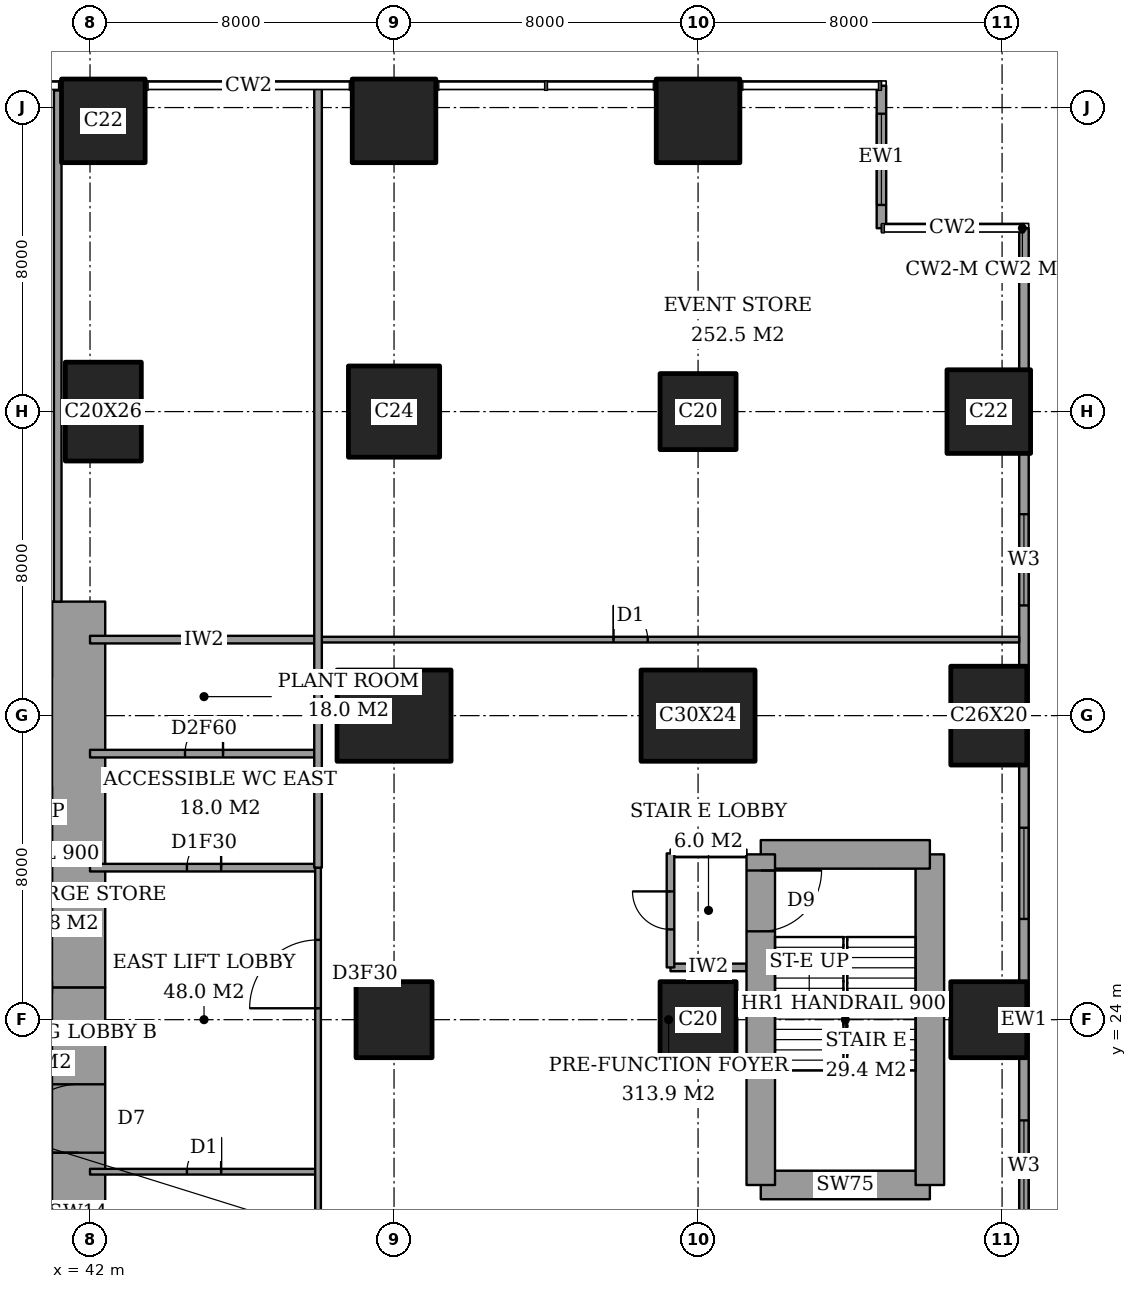
"""IFC4 building model, lengths in metres.
Left out: names, types, materials, properties, quantities, classifications, styles, units other than length and angle.
Written with IfcOpenShell. Run it as: python <this file> out.ifc"""

import sys

from ifc_helpers import new_model, si_unit, direction, frame, frame_2d, origin, origin_2d, place, context, subcontext, project, spatial, rectangle, extrude, element, fill, save


model = new_model("IFC4")
c1 = context("Model", 3, precision=1e-05, world=origin(), true_north=direction((0.0, 1.0)))
c2 = subcontext(c1, "Body", "Model", "MODEL_VIEW")
j1 = project(units=[si_unit("LENGTHUNIT", "METRE"), si_unit("PLANEANGLEUNIT", "RADIAN")], contexts=[c1])
p1 = place(None, origin())
s1 = spatial("IfcSite", under=j1, at=p1, CompositionType="ELEMENT")
p2 = place(p1, origin())
s2 = spatial("IfcBuilding", under=s1, at=p2, CompositionType="ELEMENT")
p3 = place(p2, frame((0.0, 0.0, 21.0)))
s3 = spatial("IfcBuildingStorey", under=s2, at=p3, CompositionType="ELEMENT", Elevation=21.0)
p4 = place(p3, frame((42.35, 40.0, 0.0), z_axis=(0.0, 0.0, 1.0), x_axis=(1.0, 0.0, 0.0)))
e1 = element("IfcColumn", 1, at=p4, inside=s3, PredefinedType="COLUMN", context=c2, shape_type="SweptSolid", body=[
    extrude(rectangle(XDim=2.0, YDim=2.6, at=origin_2d()), origin(), (0.0, 0.0, 1.0), 5.0),
])
p5 = place(p3, frame((42.35, 47.65, 0.0), z_axis=(0.0, 0.0, 1.0), x_axis=(1.0, 0.0, 0.0)))
e2 = element("IfcColumn", 2, at=p5, inside=s3, PredefinedType="COLUMN", context=c2, shape_type="SweptSolid", body=[
    extrude(rectangle(XDim=2.2, YDim=2.2, at=origin_2d()), origin(), (0.0, 0.0, 1.0), 5.0),
])
p6 = place(p3, frame((50.0, 24.0, 0.0), z_axis=(0.0, 0.0, 1.0), x_axis=(1.0, 0.0, 0.0)))
e3 = element("IfcColumn", 3, at=p6, inside=s3, PredefinedType="COLUMN", context=c2, shape_type="SweptSolid", body=[
    extrude(rectangle(XDim=2.0, YDim=2.0, at=origin_2d()), origin(), (0.0, 0.0, 1.0), 5.0),
])
p7 = place(p3, frame((50.0, 32.0, 0.0), z_axis=(0.0, 0.0, 1.0), x_axis=(1.0, 0.0, 0.0)))
e4 = element("IfcColumn", 4, at=p7, inside=s3, PredefinedType="COLUMN", context=c2, shape_type="SweptSolid", body=[
    extrude(rectangle(XDim=3.0, YDim=2.4, at=origin_2d()), origin(), (0.0, 0.0, 1.0), 5.0),
])
p8 = place(p3, frame((50.0, 40.0, 0.0), z_axis=(0.0, 0.0, 1.0), x_axis=(1.0, 0.0, 0.0)))
e5 = element("IfcColumn", 5, at=p8, inside=s3, PredefinedType="COLUMN", context=c2, shape_type="SweptSolid", body=[
    extrude(rectangle(XDim=2.4, YDim=2.4, at=origin_2d()), origin(), (0.0, 0.0, 1.0), 5.0),
])
p9 = place(p3, frame((50.0, 47.65, 0.0), z_axis=(0.0, 0.0, 1.0), x_axis=(1.0, 0.0, 0.0)))
e6 = element("IfcColumn", 6, at=p9, inside=s3, PredefinedType="COLUMN", context=c2, shape_type="SweptSolid", body=[
    extrude(rectangle(XDim=2.2, YDim=2.2, at=origin_2d()), origin(), (0.0, 0.0, 1.0), 5.0),
])
p10 = place(p3, frame((58.0, 24.0, 0.0), z_axis=(0.0, 0.0, 1.0), x_axis=(1.0, 0.0, 0.0)))
e7 = element("IfcColumn", 7, at=p10, inside=s3, PredefinedType="COLUMN", context=c2, shape_type="SweptSolid", body=[
    extrude(rectangle(XDim=2.0, YDim=2.0, at=origin_2d()), origin(), (0.0, 0.0, 1.0), 5.0),
])
p11 = place(p3, frame((58.0, 32.0, 0.0), z_axis=(0.0, 0.0, 1.0), x_axis=(1.0, 0.0, 0.0)))
e8 = element("IfcColumn", 8, at=p11, inside=s3, PredefinedType="COLUMN", context=c2, shape_type="SweptSolid", body=[
    extrude(rectangle(XDim=3.0, YDim=2.4, at=origin_2d()), origin(), (0.0, 0.0, 1.0), 5.0),
])
p12 = place(p3, frame((58.0, 40.0, 0.0), z_axis=(0.0, 0.0, 1.0), x_axis=(1.0, 0.0, 0.0)))
e9 = element("IfcColumn", 9, at=p12, inside=s3, PredefinedType="COLUMN", context=c2, shape_type="SweptSolid", body=[
    extrude(rectangle(XDim=2.0, YDim=2.0, at=origin_2d()), origin(), (0.0, 0.0, 1.0), 5.0),
])
p13 = place(p3, frame((58.0, 47.65, 0.0), z_axis=(0.0, 0.0, 1.0), x_axis=(1.0, 0.0, 0.0)))
e10 = element("IfcColumn", 10, at=p13, inside=s3, PredefinedType="COLUMN", context=c2, shape_type="SweptSolid", body=[
    extrude(rectangle(XDim=2.2, YDim=2.2, at=origin_2d()), origin(), (0.0, 0.0, 1.0), 5.0),
])
p14 = place(p3, frame((65.65, 24.0, 0.0), z_axis=(0.0, 0.0, 1.0), x_axis=(1.0, 0.0, 0.0)))
e11 = element("IfcColumn", 11, at=p14, inside=s3, PredefinedType="COLUMN", context=c2, shape_type="SweptSolid", body=[
    extrude(rectangle(XDim=2.0, YDim=2.0, at=origin_2d()), origin(), (0.0, 0.0, 1.0), 5.0),
])
p15 = place(p3, frame((65.65, 32.0, 0.0), z_axis=(0.0, 0.0, 1.0), x_axis=(0.0, 1.0, 0.0)))
e12 = element("IfcColumn", 12, at=p15, inside=s3, PredefinedType="COLUMN", context=c2, shape_type="SweptSolid", body=[
    extrude(rectangle(XDim=2.6, YDim=2.0, at=origin_2d()), origin(), (0.0, 0.0, 1.0), 5.0),
])
p16 = place(p3, frame((65.65, 40.0, 0.0), z_axis=(0.0, 0.0, 1.0), x_axis=(1.0, 0.0, 0.0)))
e13 = element("IfcColumn", 13, at=p16, inside=s3, PredefinedType="COLUMN", context=c2, shape_type="SweptSolid", body=[
    extrude(rectangle(XDim=2.2, YDim=2.2, at=origin_2d()), origin(), (0.0, 0.0, 1.0), 5.0),
])
p17 = place(p3, frame((41.7, 13.0, 0.0), z_axis=(0.0, 0.0, 1.0), x_axis=(0.0, 1.0, 0.0)))
e14 = element("IfcWall", 14, at=p17, inside=s3, PredefinedType="SHEAR", context=c2, shape_type="SweptSolid", body=[
    extrude(rectangle(XDim=11.85, YDim=1.4, at=frame_2d((5.925, 0.0))), origin(), (0.0, 0.0, 1.0), 5.0),
])
p18 = place(p17, frame((7.5, 0.0, 0.0)))
e15 = element("IfcOpeningElement", 15, at=p18, cuts=e14, PredefinedType="OPENING", context=c2, shape_type="SweptSolid", body=[
    extrude(rectangle(XDim=1.8, YDim=2.4, at=frame_2d((0.9, 1.2))), frame((0.0, 0.71, 0.0), z_axis=(0.0, -1.0, 0.0), x_axis=(1.0, 0.0, 0.0)), (0.0, 0.0, 1.0), 1.42),
])
p19 = place(p3, frame((41.7, 24.85, 0.0), z_axis=(0.0, 0.0, 1.0), x_axis=(0.0, 1.0, 0.0)))
e16 = element("IfcWall", 16, at=p19, inside=s3, PredefinedType="SHEAR", context=c2, shape_type="SweptSolid", body=[
    extrude(rectangle(XDim=10.15, YDim=1.4, at=frame_2d((5.075, 0.0))), origin(), (0.0, 0.0, 1.0), 5.0),
])
p20 = place(p3, frame((59.65, 19.65, 0.0), z_axis=(0.0, 0.0, 1.0), x_axis=(1.0, 0.0, 0.0)))
e17 = element("IfcWall", 17, at=p20, inside=s3, PredefinedType="SHEAR", context=c2, shape_type="SweptSolid", body=[
    extrude(rectangle(XDim=4.45, YDim=0.75, at=frame_2d((2.225, 0.0))), origin(), (0.0, 0.0, 1.0), 5.0),
])
p21 = place(p3, frame((64.1, 19.65, 0.0), z_axis=(0.0, 0.0, 1.0), x_axis=(0.0, 1.0, 0.0)))
e18 = element("IfcWall", 18, at=p21, inside=s3, PredefinedType="SHEAR", context=c2, shape_type="SweptSolid", body=[
    extrude(rectangle(XDim=8.7, YDim=0.75, at=frame_2d((4.35, 0.0))), origin(), (0.0, 0.0, 1.0), 5.0),
])
p22 = place(p3, frame((64.1, 28.35, 0.0), z_axis=(0.0, 0.0, 1.0), x_axis=(-1.0, 0.0, 0.0)))
e19 = element("IfcWall", 19, at=p22, inside=s3, PredefinedType="SHEAR", context=c2, shape_type="SweptSolid", body=[
    extrude(rectangle(XDim=4.45, YDim=0.75, at=frame_2d((2.225, 0.0))), origin(), (0.0, 0.0, 1.0), 5.0),
])
p23 = place(p3, frame((59.65, 28.35, 0.0), z_axis=(0.0, 0.0, 1.0), x_axis=(0.0, -1.0, 0.0)))
e20 = element("IfcWall", 20, at=p23, inside=s3, PredefinedType="SHEAR", context=c2, shape_type="SweptSolid", body=[
    extrude(rectangle(XDim=8.7, YDim=0.75, at=frame_2d((4.35, 0.0))), origin(), (0.0, 0.0, 1.0), 5.0),
])
p24 = place(p23, frame((0.425, 0.0, 0.0)))
e21 = element("IfcOpeningElement", 21, at=p24, cuts=e20, PredefinedType="OPENING", context=c2, shape_type="SweptSolid", body=[
    extrude(rectangle(XDim=1.6, YDim=2.1, at=frame_2d((0.8, 1.05))), frame((0.0, 0.385, 0.0), z_axis=(0.0, -1.0, 0.0), x_axis=(1.0, 0.0, 0.0)), (0.0, 0.0, 1.0), 0.77),
])
p25 = place(p3, frame((66.575, 3.175, 0.0), z_axis=(0.0, 0.0, 1.0), x_axis=(0.0, 1.0, 0.0)))
e22 = element("IfcWall", 22, at=p25, inside=s3, PredefinedType="SOLIDWALL", context=c2, shape_type="SweptSolid", body=[
    extrude(rectangle(XDim=41.65, YDim=0.25, at=frame_2d((20.825, 0.0))), origin(), (0.0, 0.0, 1.0), 5.0),
])
p26 = place(p25, frame((7.475, 0.0, 0.6)))
e23 = element("IfcOpeningElement", 23, at=p26, cuts=e22, PredefinedType="OPENING", context=c2, shape_type="SweptSolid", body=[
    extrude(rectangle(XDim=2.4, YDim=3.0, at=frame_2d((1.2, 1.5))), frame((0.0, 0.135, 0.0), z_axis=(0.0, -1.0, 0.0), x_axis=(1.0, 0.0, 0.0)), (0.0, 0.0, 1.0), 0.27),
])
p27 = place(p25, frame((15.775, 0.0, 0.6)))
e24 = element("IfcOpeningElement", 24, at=p27, cuts=e22, PredefinedType="OPENING", context=c2, shape_type="SweptSolid", body=[
    extrude(rectangle(XDim=2.4, YDim=3.0, at=frame_2d((1.2, 1.5))), frame((0.0, 0.135, 0.0), z_axis=(0.0, -1.0, 0.0), x_axis=(1.0, 0.0, 0.0)), (0.0, 0.0, 1.0), 0.27),
])
p28 = place(p25, frame((23.475, 0.0, 0.6)))
e25 = element("IfcOpeningElement", 25, at=p28, cuts=e22, PredefinedType="OPENING", context=c2, shape_type="SweptSolid", body=[
    extrude(rectangle(XDim=2.4, YDim=3.0, at=frame_2d((1.2, 1.5))), frame((0.0, 0.135, 0.0), z_axis=(0.0, -1.0, 0.0), x_axis=(1.0, 0.0, 0.0)), (0.0, 0.0, 1.0), 0.27),
])
p29 = place(p25, frame((31.725, 0.0, 0.6)))
e26 = element("IfcOpeningElement", 26, at=p29, cuts=e22, PredefinedType="OPENING", context=c2, shape_type="SweptSolid", body=[
    extrude(rectangle(XDim=2.4, YDim=3.0, at=frame_2d((1.2, 1.5))), frame((0.0, 0.135, 0.0), z_axis=(0.0, -1.0, 0.0), x_axis=(1.0, 0.0, 0.0)), (0.0, 0.0, 1.0), 0.27),
])
p30 = place(p3, frame((62.825, 44.825, 0.0), z_axis=(0.0, 0.0, 1.0), x_axis=(0.0, 1.0, 0.0)))
e27 = element("IfcWall", 27, at=p30, inside=s3, PredefinedType="SOLIDWALL", context=c2, shape_type="SweptSolid", body=[
    extrude(rectangle(XDim=3.75, YDim=0.25, at=frame_2d((1.875, 0.0))), origin(), (0.0, 0.0, 1.0), 5.0),
])
p31 = place(p30, frame((0.613, 0.0, 0.6)))
e28 = element("IfcOpeningElement", 28, at=p31, cuts=e27, PredefinedType="OPENING", context=c2, shape_type="SweptSolid", body=[
    extrude(rectangle(XDim=2.4, YDim=3.0, at=frame_2d((1.2, 1.5))), frame((0.0, 0.135, 0.0), z_axis=(0.0, -1.0, 0.0), x_axis=(1.0, 0.0, 0.0)), (0.0, 0.0, 1.0), 0.27),
])
p32 = place(p3, frame((42.0, 20.0, 0.0), z_axis=(0.0, 0.0, 1.0), x_axis=(1.0, 0.0, 0.0)))
e29 = element("IfcWall", 29, at=p32, inside=s3, PredefinedType="PARTITIONING", context=c2, shape_type="SweptSolid", body=[
    extrude(rectangle(XDim=6.0, YDim=0.15, at=frame_2d((3.0, 0.0))), origin(), (0.0, 0.0, 1.0), 4.65),
])
p33 = place(p32, frame((2.55, 0.0, 0.0)))
e30 = element("IfcOpeningElement", 30, at=p33, cuts=e29, PredefinedType="OPENING", context=c2, shape_type="SweptSolid", body=[
    extrude(rectangle(XDim=0.9, YDim=2.1, at=frame_2d((0.45, 1.05))), frame((0.0, 0.085, 0.0), z_axis=(0.0, -1.0, 0.0), x_axis=(1.0, 0.0, 0.0)), (0.0, 0.0, 1.0), 0.17),
])
p34 = place(p3, frame((57.275, 25.375, 0.0), z_axis=(0.0, 0.0, 1.0), x_axis=(1.0, 0.0, 0.0)))
e31 = element("IfcWall", 31, at=p34, inside=s3, PredefinedType="PARTITIONING", context=c2, shape_type="SweptSolid", body=[
    extrude(rectangle(XDim=2.0, YDim=0.2, at=frame_2d((1.0, 0.0))), origin(), (0.0, 0.0, 1.0), 4.65),
])
p35 = place(p3, frame((42.0, 28.0, 0.0), z_axis=(0.0, 0.0, 1.0), x_axis=(1.0, 0.0, 0.0)))
e32 = element("IfcWall", 32, at=p35, inside=s3, PredefinedType="PARTITIONING", context=c2, shape_type="SweptSolid", body=[
    extrude(rectangle(XDim=6.0, YDim=0.2, at=frame_2d((3.0, 0.0))), origin(), (0.0, 0.0, 1.0), 4.65),
])
p36 = place(p35, frame((2.55, 0.0, 0.0)))
e33 = element("IfcOpeningElement", 33, at=p36, cuts=e32, PredefinedType="OPENING", context=c2, shape_type="SweptSolid", body=[
    extrude(rectangle(XDim=0.9, YDim=2.1, at=frame_2d((0.45, 1.05))), frame((0.0, 0.11, 0.0), z_axis=(0.0, -1.0, 0.0), x_axis=(1.0, 0.0, 0.0)), (0.0, 0.0, 1.0), 0.22),
])
p37 = place(p3, frame((57.275, 28.375, 0.0), z_axis=(0.0, 0.0, 1.0), x_axis=(1.0, 0.0, 0.0)))
e34 = element("IfcWall", 34, at=p37, inside=s3, PredefinedType="PARTITIONING", context=c2, shape_type="SweptSolid", body=[
    extrude(rectangle(XDim=2.0, YDim=0.2, at=frame_2d((1.0, 0.0))), origin(), (0.0, 0.0, 1.0), 4.65),
])
p38 = place(p3, frame((42.0, 31.0, 0.0), z_axis=(0.0, 0.0, 1.0), x_axis=(1.0, 0.0, 0.0)))
e35 = element("IfcWall", 35, at=p38, inside=s3, PredefinedType="PARTITIONING", context=c2, shape_type="SweptSolid", body=[
    extrude(rectangle(XDim=6.0, YDim=0.2, at=frame_2d((3.0, 0.0))), origin(), (0.0, 0.0, 1.0), 4.65),
])
p39 = place(p38, frame((2.5, 0.0, 0.0)))
e36 = element("IfcOpeningElement", 36, at=p39, cuts=e35, PredefinedType="OPENING", context=c2, shape_type="SweptSolid", body=[
    extrude(rectangle(XDim=1.0, YDim=2.1, at=frame_2d((0.5, 1.05))), frame((0.0, 0.11, 0.0), z_axis=(0.0, -1.0, 0.0), x_axis=(1.0, 0.0, 0.0)), (0.0, 0.0, 1.0), 0.22),
])
p40 = place(p3, frame((42.0, 34.0, 0.0), z_axis=(0.0, 0.0, 1.0), x_axis=(1.0, 0.0, 0.0)))
e37 = element("IfcWall", 37, at=p40, inside=s3, PredefinedType="PARTITIONING", context=c2, shape_type="SweptSolid", body=[
    extrude(rectangle(XDim=6.0, YDim=0.2, at=frame_2d((3.0, 0.0))), origin(), (0.0, 0.0, 1.0), 4.65),
])
p41 = place(p3, frame((48.0, 34.0, 0.0), z_axis=(0.0, 0.0, 1.0), x_axis=(1.0, 0.0, 0.0)))
e38 = element("IfcWall", 38, at=p41, inside=s3, PredefinedType="PARTITIONING", context=c2, shape_type="SweptSolid", body=[
    extrude(rectangle(XDim=18.45, YDim=0.15, at=frame_2d((9.225, 0.0))), origin(), (0.0, 0.0, 1.0), 4.65),
])
p42 = place(p41, frame((7.775, 0.0, 0.0)))
e39 = element("IfcOpeningElement", 39, at=p42, cuts=e38, PredefinedType="OPENING", context=c2, shape_type="SweptSolid", body=[
    extrude(rectangle(XDim=0.9, YDim=2.1, at=frame_2d((0.45, 1.05))), frame((0.0, 0.085, 0.0), z_axis=(0.0, -1.0, 0.0), x_axis=(1.0, 0.0, 0.0)), (0.0, 0.0, 1.0), 0.17),
])
p43 = place(p3, frame((41.15, 35.0, 0.0), z_axis=(0.0, 0.0, 1.0), x_axis=(0.0, 1.0, 0.0)))
e40 = element("IfcWall", 40, at=p43, inside=s3, PredefinedType="PARTITIONING", context=c2, shape_type="SweptSolid", body=[
    extrude(rectangle(XDim=13.45, YDim=0.2, at=frame_2d((6.725, 0.0))), origin(), (0.0, 0.0, 1.0), 4.65),
])
p44 = place(p3, frame((48.0, 28.0, 0.0), z_axis=(0.0, 0.0, 1.0), x_axis=(0.0, 1.0, 0.0)))
e41 = element("IfcWall", 41, at=p44, inside=s3, PredefinedType="PARTITIONING", context=c2, shape_type="SweptSolid", body=[
    extrude(rectangle(XDim=20.561, YDim=0.2, at=frame_2d((10.281, 0.0))), origin(), (0.0, 0.0, 1.0), 4.65),
])
p45 = place(p3, frame((48.0, 14.0, 0.0), z_axis=(0.0, 0.0, 1.0), x_axis=(0.0, 1.0, 0.0)))
e42 = element("IfcWall", 42, at=p45, inside=s3, PredefinedType="PARTITIONING", context=c2, shape_type="SweptSolid", body=[
    extrude(rectangle(XDim=14.0, YDim=0.15, at=frame_2d((7.0, 0.0))), origin(), (0.0, 0.0, 1.0), 4.65),
])
p46 = place(p45, frame((10.3, 0.0, 0.0)))
e43 = element("IfcOpeningElement", 43, at=p46, cuts=e42, PredefinedType="OPENING", context=c2, shape_type="SweptSolid", body=[
    extrude(rectangle(XDim=1.8, YDim=2.1, at=frame_2d((0.9, 1.05))), frame((0.0, 0.085, 0.0), z_axis=(0.0, -1.0, 0.0), x_axis=(1.0, 0.0, 0.0)), (0.0, 0.0, 1.0), 0.17),
])
p47 = place(p3, frame((57.275, 25.375, 0.0), z_axis=(0.0, 0.0, 1.0), x_axis=(0.0, 1.0, 0.0)))
e44 = element("IfcWall", 44, at=p47, inside=s3, PredefinedType="PARTITIONING", context=c2, shape_type="SweptSolid", body=[
    extrude(rectangle(XDim=3.0, YDim=0.2, at=frame_2d((1.5, 0.0))), origin(), (0.0, 0.0, 1.0), 4.65),
])
p48 = place(p47, frame((1.0, 0.0, 0.0)))
e45 = element("IfcOpeningElement", 45, at=p48, cuts=e44, PredefinedType="OPENING", context=c2, shape_type="SweptSolid", body=[
    extrude(rectangle(XDim=1.0, YDim=2.1, at=frame_2d((0.5, 1.05))), frame((0.0, 0.11, 0.0), z_axis=(0.0, -1.0, 0.0), x_axis=(1.0, 0.0, 0.0)), (0.0, 0.0, 1.0), 0.22),
])
p49 = place(p27, origin())
e46 = element("IfcWindow", 46, at=p49, inside=s3, PartitioningType="SINGLE_PANEL", PredefinedType="WINDOW", context=c2, shape_type="SweptSolid", body=[
    extrude(rectangle(XDim=2.4, YDim=3.0, at=frame_2d((1.2, 1.5))), frame((0.0, 0.03, 0.0), z_axis=(0.0, -1.0, 0.0), x_axis=(1.0, 0.0, 0.0)), (0.0, 0.0, 1.0), 0.06),
])
fill(e24, e46)
p50 = place(p28, origin())
e47 = element("IfcWindow", 47, at=p50, inside=s3, PartitioningType="SINGLE_PANEL", PredefinedType="WINDOW", context=c2, shape_type="SweptSolid", body=[
    extrude(rectangle(XDim=2.4, YDim=3.0, at=frame_2d((1.2, 1.5))), frame((0.0, 0.03, 0.0), z_axis=(0.0, -1.0, 0.0), x_axis=(1.0, 0.0, 0.0)), (0.0, 0.0, 1.0), 0.06),
])
fill(e25, e47)
p51 = place(p29, origin())
e48 = element("IfcWindow", 48, at=p51, inside=s3, PartitioningType="SINGLE_PANEL", PredefinedType="WINDOW", context=c2, shape_type="SweptSolid", body=[
    extrude(rectangle(XDim=2.4, YDim=3.0, at=frame_2d((1.2, 1.5))), frame((0.0, 0.03, 0.0), z_axis=(0.0, -1.0, 0.0), x_axis=(1.0, 0.0, 0.0)), (0.0, 0.0, 1.0), 0.06),
])
fill(e26, e48)
p52 = place(p31, origin())
e49 = element("IfcWindow", 49, at=p52, inside=s3, PartitioningType="SINGLE_PANEL", PredefinedType="WINDOW", context=c2, shape_type="SweptSolid", body=[
    extrude(rectangle(XDim=2.4, YDim=3.0, at=frame_2d((1.2, 1.5))), frame((0.0, 0.03, 0.0), z_axis=(0.0, -1.0, 0.0), x_axis=(1.0, 0.0, 0.0)), (0.0, 0.0, 1.0), 0.06),
])
fill(e28, e49)
p53 = place(p42, origin())
e50 = element("IfcDoor", 50, at=p53, inside=s3, OperationType="SINGLE_SWING_RIGHT", PredefinedType="DOOR", context=c2, shape_type="SweptSolid", body=[
    extrude(rectangle(XDim=0.9, YDim=2.1, at=frame_2d((0.45, 1.05))), frame((0.0, 0.025, 0.0), z_axis=(0.0, -1.0, 0.0), x_axis=(1.0, 0.0, 0.0)), (0.0, 0.0, 1.0), 0.05),
])
fill(e39, e50)
p54 = place(p46, origin())
e51 = element("IfcDoor", 51, at=p54, inside=s3, OperationType="DOUBLE_DOOR_DOUBLE_SWING", PredefinedType="DOOR", context=c2, shape_type="SweptSolid", body=[
    extrude(rectangle(XDim=1.8, YDim=2.1, at=frame_2d((0.9, 1.05))), frame((0.0, 0.025, 0.0), z_axis=(0.0, -1.0, 0.0), x_axis=(1.0, 0.0, 0.0)), (0.0, 0.0, 1.0), 0.05),
])
fill(e43, e51)
p55 = place(p36, origin())
e52 = element("IfcDoor", 52, at=p55, inside=s3, OperationType="SINGLE_SWING_LEFT", PredefinedType="DOOR", context=c2, shape_type="SweptSolid", body=[
    extrude(rectangle(XDim=0.9, YDim=2.1, at=frame_2d((0.45, 1.05))), frame((0.0, 0.025, 0.0), z_axis=(0.0, -1.0, 0.0), x_axis=(1.0, 0.0, 0.0)), (0.0, 0.0, 1.0), 0.05),
])
fill(e33, e52)
p56 = place(p33, origin())
e53 = element("IfcDoor", 53, at=p56, inside=s3, OperationType="SINGLE_SWING_LEFT", PredefinedType="DOOR", context=c2, shape_type="SweptSolid", body=[
    extrude(rectangle(XDim=0.9, YDim=2.1, at=frame_2d((0.45, 1.05))), frame((0.0, 0.025, 0.0), z_axis=(0.0, -1.0, 0.0), x_axis=(1.0, 0.0, 0.0)), (0.0, 0.0, 1.0), 0.05),
])
fill(e30, e53)
p57 = place(p39, origin())
e54 = element("IfcDoor", 54, at=p57, inside=s3, OperationType="SINGLE_SWING_LEFT", PredefinedType="DOOR", context=c2, shape_type="SweptSolid", body=[
    extrude(rectangle(XDim=1.0, YDim=2.1, at=frame_2d((0.5, 1.05))), frame((0.0, 0.025, 0.0), z_axis=(0.0, -1.0, 0.0), x_axis=(1.0, 0.0, 0.0)), (0.0, 0.0, 1.0), 0.05),
])
fill(e36, e54)
p58 = place(p48, origin())
e55 = element("IfcDoor", 55, at=p58, inside=s3, OperationType="SINGLE_SWING_LEFT", PredefinedType="DOOR", context=c2, shape_type="SweptSolid", body=[
    extrude(rectangle(XDim=1.0, YDim=2.1, at=frame_2d((0.5, 1.05))), frame((0.0, 0.025, 0.0), z_axis=(0.0, -1.0, 0.0), x_axis=(1.0, 0.0, 0.0)), (0.0, 0.0, 1.0), 0.05),
])
fill(e45, e55)
p59 = place(p18, origin())
e56 = element("IfcDoor", 56, at=p59, inside=s3, OperationType="DOUBLE_DOOR_DOUBLE_SWING", PredefinedType="DOOR", context=c2, shape_type="SweptSolid", body=[
    extrude(rectangle(XDim=1.8, YDim=2.4, at=frame_2d((0.9, 1.2))), frame((0.0, 0.025, 0.0), z_axis=(0.0, -1.0, 0.0), x_axis=(1.0, 0.0, 0.0)), (0.0, 0.0, 1.0), 0.05),
])
fill(e15, e56)
p60 = place(p24, origin())
e57 = element("IfcDoor", 57, at=p60, inside=s3, OperationType="DOUBLE_DOOR_SINGLE_SWING", PredefinedType="DOOR", context=c2, shape_type="SweptSolid", body=[
    extrude(rectangle(XDim=1.6, YDim=2.1, at=frame_2d((0.8, 1.05))), frame((0.0, 0.025, 0.0), z_axis=(0.0, -1.0, 0.0), x_axis=(1.0, 0.0, 0.0)), (0.0, 0.0, 1.0), 0.05),
])
fill(e21, e57)
save(model, sys.argv[1])
